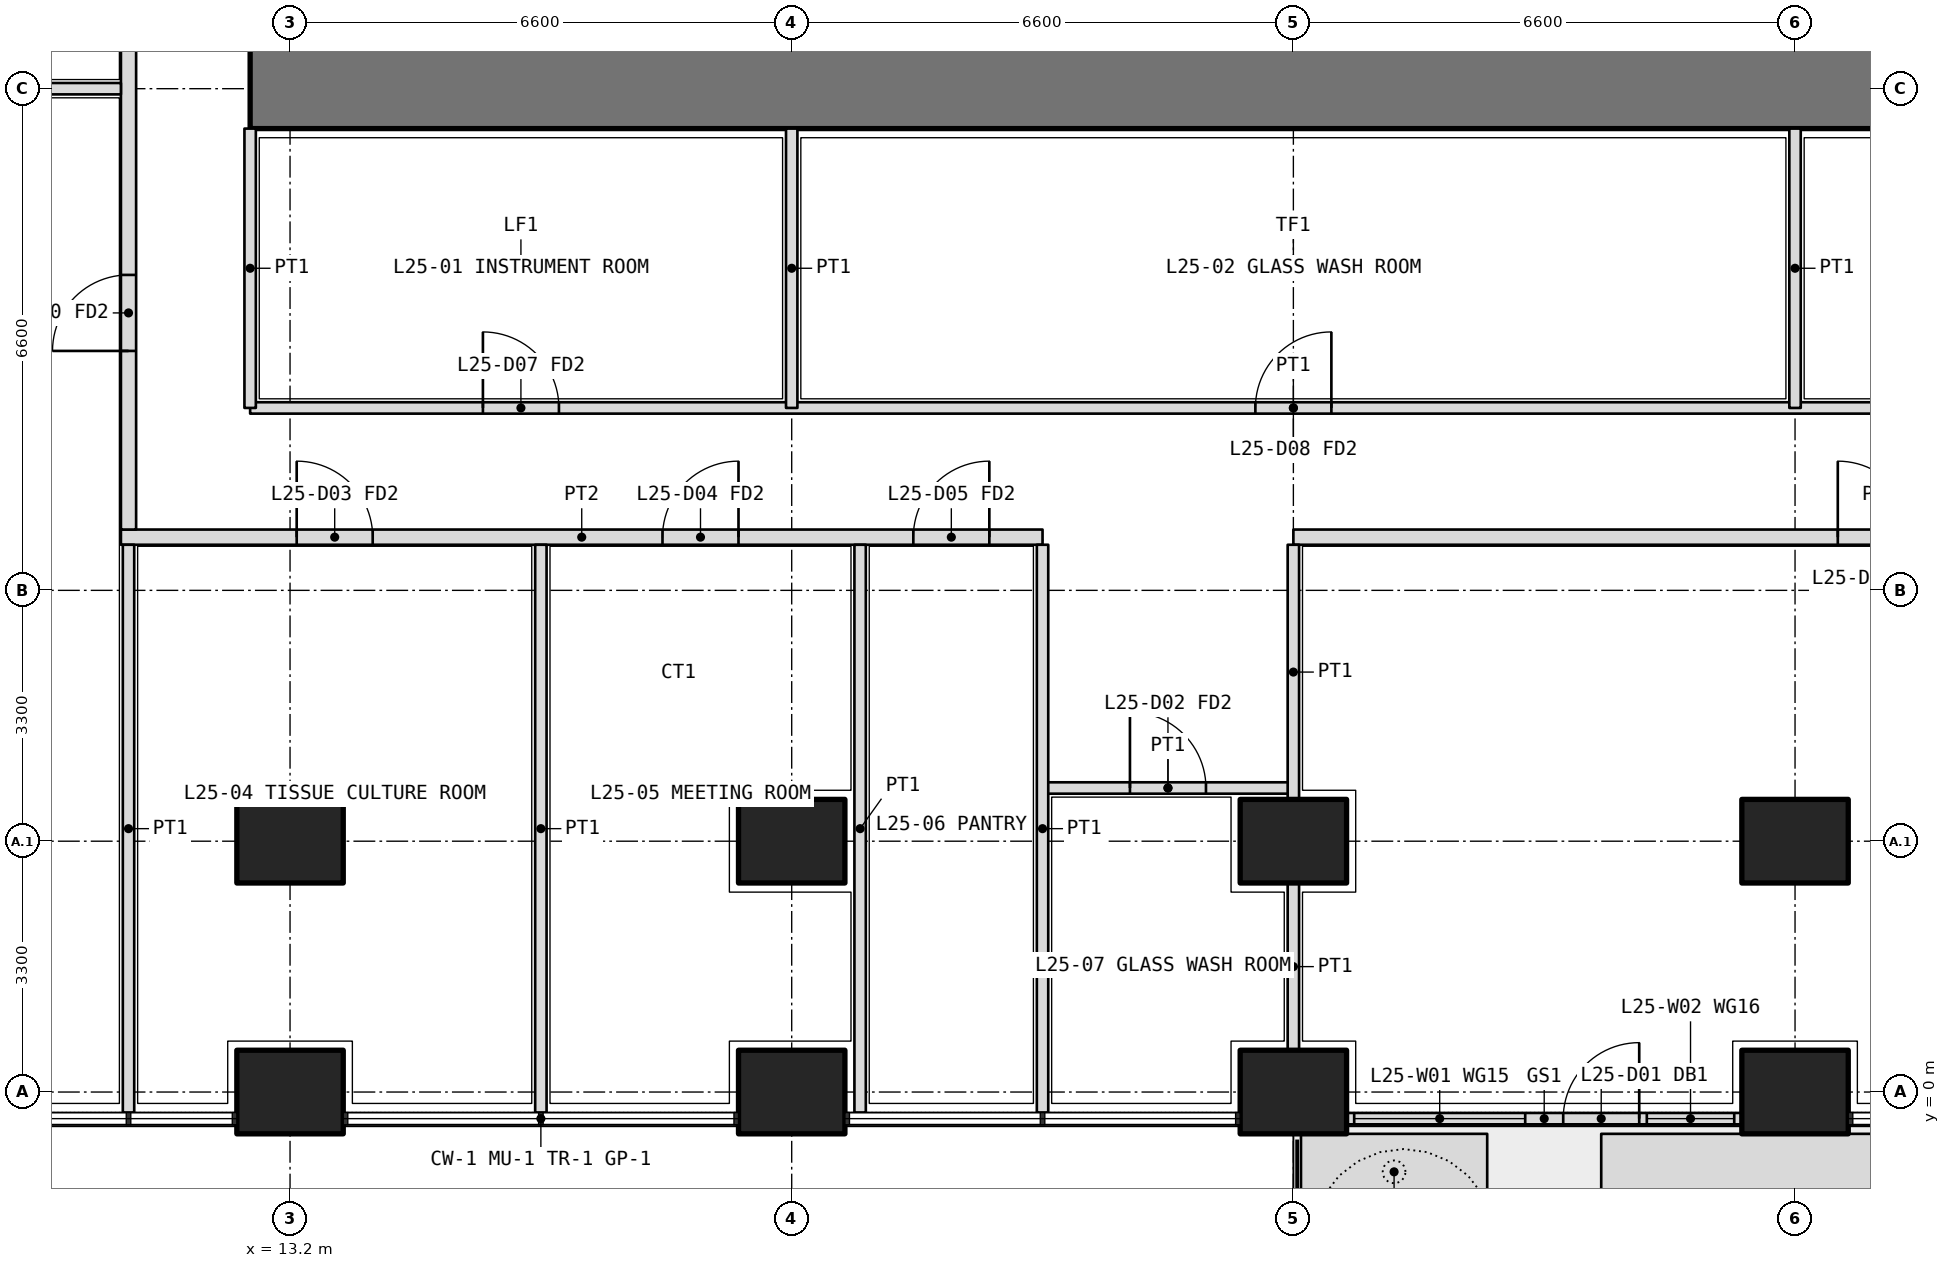
"""IFC4 building model, lengths in metres.
Left out: names, types, materials, properties, quantities, classifications, styles, units other than length and angle.
Written with IfcOpenShell. Run it as: python <this file> out.ifc"""

import sys

from ifc_helpers import new_model, si_unit, direction, frame, frame_2d, origin, origin_2d, place, context, subcontext, project, spatial, polyline, rectangle, outline, extrude, element, fill, save


model = new_model("IFC4")
c1 = context("Model", 3, precision=1e-05, world=origin(), true_north=direction((0.0, 1.0)))
c2 = subcontext(c1, "Body", "Model", "MODEL_VIEW")
j1 = project(units=[si_unit("LENGTHUNIT", "METRE"), si_unit("PLANEANGLEUNIT", "RADIAN")], contexts=[c1])
p1 = place(None, origin())
s1 = spatial("IfcSite", under=j1, at=p1, CompositionType="ELEMENT")
p2 = place(p1, origin())
s2 = spatial("IfcBuilding", under=s1, at=p2, CompositionType="ELEMENT")
p3 = place(p2, frame((0.0, 0.0, 111.6)))
s3 = spatial("IfcBuildingStorey", under=s2, at=p3, CompositionType="ELEMENT", Elevation=111.6)
for number, where, z_axis, x_axis in (
    (1, (13.2, 0.0, 0.0), (0.0, 0.0, 1.0), (1.0, 0.0, 0.0)),
    (2, (19.8, 0.0, 0.0), (0.0, 0.0, 1.0), (1.0, 0.0, 0.0)),
    (3, (26.4, 0.0, 0.0), (0.0, 0.0, 1.0), (1.0, 0.0, 0.0)),
    (4, (33.0, 0.0, 0.0), (0.0, 0.0, 1.0), (1.0, 0.0, 0.0)),
    (5, (13.2, 3.3, 0.0), (0.0, 0.0, 1.0), (1.0, 0.0, 0.0)),
    (6, (19.8, 3.3, 0.0), (0.0, 0.0, 1.0), (1.0, 0.0, 0.0)),
    (7, (26.4, 3.3, 0.0), (0.0, 0.0, 1.0), (1.0, 0.0, 0.0)),
    (8, (33.0, 3.3, 0.0), (0.0, 0.0, 1.0), (1.0, 0.0, 0.0)),
):
    element("IfcColumn", number, at=place(p3, frame(where, z_axis=z_axis, x_axis=x_axis)), inside=s3, PredefinedType="COLUMN", context=c2, shape_type="SweptSolid", body=[
        extrude(rectangle(XDim=1.4, YDim=1.1, at=origin_2d()), origin(), (0.0, 0.0, 1.0), 4.2),
    ])
p4 = place(p3, origin())
e9 = element("IfcWall", 9, at=p4, inside=s3, PredefinedType="USERDEFINED", context=c2, shape_type="SweptSolid", body=[
    extrude(outline(polyline([(26.5, -1.55), (28.95, -1.55), (28.95, -0.55), (26.5, -0.55), (26.5, -1.55)]), holes=[polyline([(26.65, -1.4), (28.8, -1.4), (28.8, -0.7), (26.65, -0.7), (26.65, -1.4)])]), origin(), (0.0, 0.0, 1.0), 1.05),
])
p5 = place(p3, origin())
e10 = element("IfcWall", 10, at=p5, inside=s3, PredefinedType="USERDEFINED", context=c2, shape_type="SweptSolid", body=[
    extrude(outline(polyline([(30.45, -1.55), (39.5, -1.55), (39.5, -0.55), (30.45, -0.55), (30.45, -1.55)]), holes=[polyline([(30.6, -1.4), (39.35, -1.4), (39.35, -0.7), (30.6, -0.7), (30.6, -1.4)])]), origin(), (0.0, 0.0, 1.0), 1.05),
])
p6 = place(p3, frame((27.1, -0.35, 0.0), z_axis=(0.0, 0.0, 1.0), x_axis=(1.0, 0.0, 0.0)))
e11 = element("IfcWall", 11, at=p6, inside=s3, PredefinedType="SOLIDWALL", context=c2, shape_type="SweptSolid", body=[
    extrude(rectangle(XDim=5.2, YDim=0.15, at=frame_2d((2.6, 0.0))), origin(), (0.0, 0.0, 1.0), 2.7),
])
p7 = place(p6, frame((2.85, 0.0, 0.0)))
e12 = element("IfcOpeningElement", 12, at=p7, cuts=e11, PredefinedType="OPENING", context=c2, shape_type="SweptSolid", body=[
    extrude(rectangle(XDim=1.0, YDim=2.4, at=frame_2d((0.5, 1.2))), frame((0.0, 0.085, 0.0), z_axis=(0.0, -1.0, 0.0), x_axis=(1.0, 0.0, 0.0)), (0.0, 0.0, 1.0), 0.17),
])
p8 = place(p6, frame((0.1, 0.0, 0.1)))
e13 = element("IfcOpeningElement", 13, at=p8, cuts=e11, PredefinedType="OPENING", context=c2, shape_type="SweptSolid", body=[
    extrude(rectangle(XDim=2.25, YDim=2.3, at=frame_2d((1.125, 1.15))), frame((0.0, 0.085, 0.0), z_axis=(0.0, -1.0, 0.0), x_axis=(1.0, 0.0, 0.0)), (0.0, 0.0, 1.0), 0.17),
])
p9 = place(p6, frame((3.95, 0.0, 0.1)))
e14 = element("IfcOpeningElement", 14, at=p9, cuts=e11, PredefinedType="OPENING", context=c2, shape_type="SweptSolid", body=[
    extrude(rectangle(XDim=1.15, YDim=2.3, at=frame_2d((0.575, 1.15))), frame((0.0, 0.085, 0.0), z_axis=(0.0, -1.0, 0.0), x_axis=(1.0, 0.0, 0.0)), (0.0, 0.0, 1.0), 0.17),
])
p10 = place(p3, frame((12.675, 13.2, 0.0), z_axis=(0.0, 0.0, 1.0), x_axis=(1.0, 0.0, 0.0)))
e15 = element("IfcWall", 15, at=p10, inside=s3, PredefinedType="SHEAR", context=c2, shape_type="SweptSolid", body=[
    extrude(rectangle(XDim=27.45, YDim=1.05, at=frame_2d((13.725, 0.0))), origin(), (0.0, 0.0, 1.0), 4.2),
])
p11 = place(p3, frame((12.675, 9.0, 0.0), z_axis=(0.0, 0.0, 1.0), x_axis=(1.0, 0.0, 0.0)))
e16 = element("IfcWall", 16, at=p11, inside=s3, PredefinedType="PARTITIONING", context=c2, shape_type="SweptSolid", body=[
    extrude(rectangle(XDim=27.45, YDim=0.15, at=frame_2d((13.725, 0.0))), origin(), (0.0, 0.0, 1.0), 2.85),
])
p12 = place(p11, frame((3.062, 0.0, 0.0)))
e17 = element("IfcOpeningElement", 17, at=p12, cuts=e16, PredefinedType="OPENING", context=c2, shape_type="SweptSolid", body=[
    extrude(rectangle(XDim=1.0, YDim=2.1, at=frame_2d((0.5, 1.05))), frame((0.0, 0.085, 0.0), z_axis=(0.0, -1.0, 0.0), x_axis=(1.0, 0.0, 0.0)), (0.0, 0.0, 1.0), 0.17),
])
p13 = place(p11, frame((13.225, 0.0, 0.0)))
e18 = element("IfcOpeningElement", 18, at=p13, cuts=e16, PredefinedType="OPENING", context=c2, shape_type="SweptSolid", body=[
    extrude(rectangle(XDim=1.0, YDim=2.1, at=frame_2d((0.5, 1.05))), frame((0.0, 0.085, 0.0), z_axis=(0.0, -1.0, 0.0), x_axis=(1.0, 0.0, 0.0)), (0.0, 0.0, 1.0), 0.17),
])
p14 = place(p11, frame((23.387, 0.0, 0.0)))
e19 = element("IfcOpeningElement", 19, at=p14, cuts=e16, PredefinedType="OPENING", context=c2, shape_type="SweptSolid", body=[
    extrude(rectangle(XDim=1.0, YDim=2.1, at=frame_2d((0.5, 1.05))), frame((0.0, 0.085, 0.0), z_axis=(0.0, -1.0, 0.0), x_axis=(1.0, 0.0, 0.0)), (0.0, 0.0, 1.0), 0.17),
])
for number, where, z_axis, x_axis in (
    (20, (12.675, 12.675, 0.0), (0.0, 0.0, 1.0), (0.0, -1.0, 0.0)),
    (21, (19.8, 12.675, 0.0), (0.0, 0.0, 1.0), (0.0, -1.0, 0.0)),
    (22, (33.0, 12.675, 0.0), (0.0, 0.0, 1.0), (0.0, -1.0, 0.0)),
):
    element("IfcWall", number, at=place(p3, frame(where, z_axis=z_axis, x_axis=x_axis)), inside=s3, PredefinedType="PARTITIONING", context=c2, shape_type="SweptSolid", body=[
        extrude(rectangle(XDim=3.675, YDim=0.15, at=frame_2d((1.837, 0.0))), origin(), (0.0, 0.0, 1.0), 2.85),
    ])
p15 = place(p3, frame((10.975, 7.3, 0.0), z_axis=(0.0, 0.0, 1.0), x_axis=(1.0, 0.0, 0.0)))
e23 = element("IfcWall", 23, at=p15, inside=s3, PredefinedType="PARTITIONING", context=c2, shape_type="SweptSolid", body=[
    extrude(rectangle(XDim=12.125, YDim=0.2, at=frame_2d((6.062, 0.0))), origin(), (0.0, 0.0, 1.0), 2.85),
])
p16 = place(p15, frame((2.312, 0.0, 0.0)))
e24 = element("IfcOpeningElement", 24, at=p16, cuts=e23, PredefinedType="OPENING", context=c2, shape_type="SweptSolid", body=[
    extrude(rectangle(XDim=1.0, YDim=2.1, at=frame_2d((0.5, 1.05))), frame((0.0, 0.11, 0.0), z_axis=(0.0, -1.0, 0.0), x_axis=(1.0, 0.0, 0.0)), (0.0, 0.0, 1.0), 0.22),
])
p17 = place(p15, frame((7.125, 0.0, 0.0)))
e25 = element("IfcOpeningElement", 25, at=p17, cuts=e23, PredefinedType="OPENING", context=c2, shape_type="SweptSolid", body=[
    extrude(rectangle(XDim=1.0, YDim=2.1, at=frame_2d((0.5, 1.05))), frame((0.0, 0.11, 0.0), z_axis=(0.0, -1.0, 0.0), x_axis=(1.0, 0.0, 0.0)), (0.0, 0.0, 1.0), 0.22),
])
p18 = place(p15, frame((10.425, 0.0, 0.0)))
e26 = element("IfcOpeningElement", 26, at=p18, cuts=e23, PredefinedType="OPENING", context=c2, shape_type="SweptSolid", body=[
    extrude(rectangle(XDim=1.0, YDim=2.1, at=frame_2d((0.5, 1.05))), frame((0.0, 0.11, 0.0), z_axis=(0.0, -1.0, 0.0), x_axis=(1.0, 0.0, 0.0)), (0.0, 0.0, 1.0), 0.22),
])
p19 = place(p3, frame((26.4, 7.3, 0.0), z_axis=(0.0, 0.0, 1.0), x_axis=(1.0, 0.0, 0.0)))
e27 = element("IfcWall", 27, at=p19, inside=s3, PredefinedType="PARTITIONING", context=c2, shape_type="SweptSolid", body=[
    extrude(rectangle(XDim=15.425, YDim=0.2, at=frame_2d((7.712, 0.0))), origin(), (0.0, 0.0, 1.0), 2.85),
])
p20 = place(p19, frame((7.163, 0.0, 0.0)))
e28 = element("IfcOpeningElement", 28, at=p20, cuts=e27, PredefinedType="OPENING", context=c2, shape_type="SweptSolid", body=[
    extrude(rectangle(XDim=1.0, YDim=2.1, at=frame_2d((0.5, 1.05))), frame((0.0, 0.11, 0.0), z_axis=(0.0, -1.0, 0.0), x_axis=(1.0, 0.0, 0.0)), (0.0, 0.0, 1.0), 0.22),
])
p21 = place(p3, frame((11.075, 7.4, 0.0), z_axis=(0.0, 0.0, 1.0), x_axis=(0.0, 1.0, 0.0)))
e29 = element("IfcWall", 29, at=p21, inside=s3, PredefinedType="PARTITIONING", context=c2, shape_type="SweptSolid", body=[
    extrude(rectangle(XDim=27.625, YDim=0.2, at=frame_2d((13.812, 0.0))), origin(), (0.0, 0.0, 1.0), 2.85),
])
p22 = place(p21, frame((2.35, 0.0, 0.0)))
e30 = element("IfcOpeningElement", 30, at=p22, cuts=e29, PredefinedType="OPENING", context=c2, shape_type="SweptSolid", body=[
    extrude(rectangle(XDim=1.0, YDim=2.1, at=frame_2d((0.5, 1.05))), frame((0.0, 0.11, 0.0), z_axis=(0.0, -1.0, 0.0), x_axis=(1.0, 0.0, 0.0)), (0.0, 0.0, 1.0), 0.22),
])
p23 = place(p21, frame((6.35, 0.0, 0.0)))
e31 = element("IfcOpeningElement", 31, at=p23, cuts=e29, PredefinedType="OPENING", context=c2, shape_type="SweptSolid", body=[
    extrude(rectangle(XDim=1.0, YDim=2.1, at=frame_2d((0.5, 1.05))), frame((0.0, 0.11, 0.0), z_axis=(0.0, -1.0, 0.0), x_axis=(1.0, 0.0, 0.0)), (0.0, 0.0, 1.0), 0.22),
])
p24 = place(p21, frame((9.425, 0.0, 0.0)))
e32 = element("IfcOpeningElement", 32, at=p24, cuts=e29, PredefinedType="OPENING", context=c2, shape_type="SweptSolid", body=[
    extrude(rectangle(XDim=0.9, YDim=2.1, at=frame_2d((0.45, 1.05))), frame((0.0, 0.11, 0.0), z_axis=(0.0, -1.0, 0.0), x_axis=(1.0, 0.0, 0.0)), (0.0, 0.0, 1.0), 0.22),
])
p25 = place(p21, frame((13.275, 0.0, 0.0)))
e33 = element("IfcOpeningElement", 33, at=p25, cuts=e29, PredefinedType="OPENING", context=c2, shape_type="SweptSolid", body=[
    extrude(rectangle(XDim=0.9, YDim=2.1, at=frame_2d((0.45, 1.05))), frame((0.0, 0.11, 0.0), z_axis=(0.0, -1.0, 0.0), x_axis=(1.0, 0.0, 0.0)), (0.0, 0.0, 1.0), 0.22),
])
p26 = place(p21, frame((16.8, 0.0, 0.0)))
e34 = element("IfcOpeningElement", 34, at=p26, cuts=e29, PredefinedType="OPENING", context=c2, shape_type="SweptSolid", body=[
    extrude(rectangle(XDim=1.0, YDim=2.1, at=frame_2d((0.5, 1.05))), frame((0.0, 0.11, 0.0), z_axis=(0.0, -1.0, 0.0), x_axis=(1.0, 0.0, 0.0)), (0.0, 0.0, 1.0), 0.22),
])
p27 = place(p21, frame((20.15, 0.0, 0.0)))
e35 = element("IfcOpeningElement", 35, at=p27, cuts=e29, PredefinedType="OPENING", context=c2, shape_type="SweptSolid", body=[
    extrude(rectangle(XDim=1.0, YDim=2.1, at=frame_2d((0.5, 1.05))), frame((0.0, 0.11, 0.0), z_axis=(0.0, -1.0, 0.0), x_axis=(1.0, 0.0, 0.0)), (0.0, 0.0, 1.0), 0.22),
])
p28 = place(p21, frame((23.45, 0.0, 0.0)))
e36 = element("IfcOpeningElement", 36, at=p28, cuts=e29, PredefinedType="OPENING", context=c2, shape_type="SweptSolid", body=[
    extrude(rectangle(XDim=1.0, YDim=2.1, at=frame_2d((0.5, 1.05))), frame((0.0, 0.11, 0.0), z_axis=(0.0, -1.0, 0.0), x_axis=(1.0, 0.0, 0.0)), (0.0, 0.0, 1.0), 0.22),
])
p29 = place(p21, frame((26.163, 0.0, 0.0)))
e37 = element("IfcOpeningElement", 37, at=p29, cuts=e29, PredefinedType="OPENING", context=c2, shape_type="SweptSolid", body=[
    extrude(rectangle(XDim=1.0, YDim=2.1, at=frame_2d((0.5, 1.05))), frame((0.0, 0.11, 0.0), z_axis=(0.0, -1.0, 0.0), x_axis=(1.0, 0.0, 0.0)), (0.0, 0.0, 1.0), 0.22),
])
for number, where, z_axis, x_axis in (
    (38, (11.075, -0.27, 0.0), (0.0, 0.0, 1.0), (0.0, 1.0, 0.0)),
    (39, (20.7, -0.27, 0.0), (0.0, 0.0, 1.0), (0.0, 1.0, 0.0)),
):
    element("IfcWall", number, at=place(p3, frame(where, z_axis=z_axis, x_axis=x_axis)), inside=s3, PredefinedType="PARTITIONING", context=c2, shape_type="SweptSolid", body=[
        extrude(rectangle(XDim=7.47, YDim=0.15, at=frame_2d((3.735, 0.0))), origin(), (0.0, 0.0, 1.0), 2.7),
    ])
p30 = place(p3, frame((23.1, 4.0, 0.0), z_axis=(0.0, 0.0, 1.0), x_axis=(1.0, 0.0, 0.0)))
e40 = element("IfcWall", 40, at=p30, inside=s3, PredefinedType="PARTITIONING", context=c2, shape_type="SweptSolid", body=[
    extrude(rectangle(XDim=3.3, YDim=0.15, at=frame_2d((1.65, 0.0))), origin(), (0.0, 0.0, 1.0), 2.85),
])
p31 = place(p30, frame((1.15, 0.0, 0.0)))
e41 = element("IfcOpeningElement", 41, at=p31, cuts=e40, PredefinedType="OPENING", context=c2, shape_type="SweptSolid", body=[
    extrude(rectangle(XDim=1.0, YDim=2.1, at=frame_2d((0.5, 1.05))), frame((0.0, 0.085, 0.0), z_axis=(0.0, -1.0, 0.0), x_axis=(1.0, 0.0, 0.0)), (0.0, 0.0, 1.0), 0.17),
])
for number, where, z_axis, x_axis in (
    (42, (16.5, -0.27, 0.0), (0.0, 0.0, 1.0), (0.0, 1.0, 0.0)),
    (43, (23.1, -0.27, 0.0), (0.0, 0.0, 1.0), (0.0, 1.0, 0.0)),
):
    element("IfcWall", number, at=place(p3, frame(where, z_axis=z_axis, x_axis=x_axis)), inside=s3, PredefinedType="PARTITIONING", context=c2, shape_type="SweptSolid", body=[
        extrude(rectangle(XDim=7.47, YDim=0.15, at=frame_2d((3.735, 0.0))), origin(), (0.0, 0.0, 1.0), 2.7),
    ])
p32 = place(p3, frame((26.4, 0.55, 0.0), z_axis=(0.0, 0.0, 1.0), x_axis=(0.0, 1.0, 0.0)))
e44 = element("IfcWall", 44, at=p32, inside=s3, PredefinedType="PARTITIONING", context=c2, shape_type="SweptSolid", body=[
    extrude(rectangle(XDim=2.2, YDim=0.15, at=frame_2d((1.1, 0.0))), origin(), (0.0, 0.0, 1.0), 2.85),
])
p33 = place(p3, frame((26.4, 3.85, 0.0), z_axis=(0.0, 0.0, 1.0), x_axis=(0.0, 1.0, 0.0)))
e45 = element("IfcWall", 45, at=p33, inside=s3, PredefinedType="PARTITIONING", context=c2, shape_type="SweptSolid", body=[
    extrude(rectangle(XDim=3.35, YDim=0.15, at=frame_2d((1.675, 0.0))), origin(), (0.0, 0.0, 1.0), 2.85),
])
p34 = place(p3, frame((7.15, 13.2, 0.0), z_axis=(0.0, 0.0, 1.0), x_axis=(1.0, 0.0, 0.0)))
e46 = element("IfcWall", 46, at=p34, inside=s3, PredefinedType="PARTITIONING", context=c2, shape_type="SweptSolid", body=[
    extrude(rectangle(XDim=3.825, YDim=0.15, at=frame_2d((1.913, 0.0))), origin(), (0.0, 0.0, 1.0), 2.85),
])
p35 = place(p7, origin())
e47 = element("IfcDoor", 47, at=p35, inside=s3, OperationType="SINGLE_SWING_RIGHT", PredefinedType="DOOR", context=c2, shape_type="SweptSolid", body=[
    extrude(rectangle(XDim=1.0, YDim=2.4, at=frame_2d((0.5, 1.2))), frame((0.0, 0.025, 0.0), z_axis=(0.0, -1.0, 0.0), x_axis=(1.0, 0.0, 0.0)), (0.0, 0.0, 1.0), 0.05),
])
fill(e12, e47)
p36 = place(p8, origin())
e48 = element("IfcWindow", 48, at=p36, inside=s3, PartitioningType="SINGLE_PANEL", PredefinedType="WINDOW", context=c2, shape_type="SweptSolid", body=[
    extrude(rectangle(XDim=2.25, YDim=2.3, at=frame_2d((1.125, 1.15))), frame((0.0, 0.03, 0.0), z_axis=(0.0, -1.0, 0.0), x_axis=(1.0, 0.0, 0.0)), (0.0, 0.0, 1.0), 0.06),
])
fill(e13, e48)
p37 = place(p9, origin())
e49 = element("IfcWindow", 49, at=p37, inside=s3, PartitioningType="SINGLE_PANEL", PredefinedType="WINDOW", context=c2, shape_type="SweptSolid", body=[
    extrude(rectangle(XDim=1.15, YDim=2.3, at=frame_2d((0.575, 1.15))), frame((0.0, 0.03, 0.0), z_axis=(0.0, -1.0, 0.0), x_axis=(1.0, 0.0, 0.0)), (0.0, 0.0, 1.0), 0.06),
])
fill(e14, e49)
p38 = place(p12, origin())
e50 = element("IfcDoor", 50, at=p38, inside=s3, OperationType="SINGLE_SWING_LEFT", PredefinedType="DOOR", context=c2, shape_type="SweptSolid", body=[
    extrude(rectangle(XDim=1.0, YDim=2.1, at=frame_2d((0.5, 1.05))), frame((0.0, 0.025, 0.0), z_axis=(0.0, -1.0, 0.0), x_axis=(1.0, 0.0, 0.0)), (0.0, 0.0, 1.0), 0.05),
])
fill(e17, e50)
p39 = place(p13, origin())
e51 = element("IfcDoor", 51, at=p39, inside=s3, OperationType="SINGLE_SWING_RIGHT", PredefinedType="DOOR", context=c2, shape_type="SweptSolid", body=[
    extrude(rectangle(XDim=1.0, YDim=2.1, at=frame_2d((0.5, 1.05))), frame((0.0, 0.025, 0.0), z_axis=(0.0, -1.0, 0.0), x_axis=(1.0, 0.0, 0.0)), (0.0, 0.0, 1.0), 0.05),
])
fill(e18, e51)
p40 = place(p16, origin())
e52 = element("IfcDoor", 52, at=p40, inside=s3, OperationType="SINGLE_SWING_LEFT", PredefinedType="DOOR", context=c2, shape_type="SweptSolid", body=[
    extrude(rectangle(XDim=1.0, YDim=2.1, at=frame_2d((0.5, 1.05))), frame((0.0, 0.025, 0.0), z_axis=(0.0, -1.0, 0.0), x_axis=(1.0, 0.0, 0.0)), (0.0, 0.0, 1.0), 0.05),
])
fill(e24, e52)
p41 = place(p17, origin())
e53 = element("IfcDoor", 53, at=p41, inside=s3, OperationType="SINGLE_SWING_RIGHT", PredefinedType="DOOR", context=c2, shape_type="SweptSolid", body=[
    extrude(rectangle(XDim=1.0, YDim=2.1, at=frame_2d((0.5, 1.05))), frame((0.0, 0.025, 0.0), z_axis=(0.0, -1.0, 0.0), x_axis=(1.0, 0.0, 0.0)), (0.0, 0.0, 1.0), 0.05),
])
fill(e25, e53)
p42 = place(p18, origin())
e54 = element("IfcDoor", 54, at=p42, inside=s3, OperationType="SINGLE_SWING_RIGHT", PredefinedType="DOOR", context=c2, shape_type="SweptSolid", body=[
    extrude(rectangle(XDim=1.0, YDim=2.1, at=frame_2d((0.5, 1.05))), frame((0.0, 0.025, 0.0), z_axis=(0.0, -1.0, 0.0), x_axis=(1.0, 0.0, 0.0)), (0.0, 0.0, 1.0), 0.05),
])
fill(e26, e54)
p43 = place(p31, origin())
e55 = element("IfcDoor", 55, at=p43, inside=s3, OperationType="SINGLE_SWING_LEFT", PredefinedType="DOOR", context=c2, shape_type="SweptSolid", body=[
    extrude(rectangle(XDim=1.0, YDim=2.1, at=frame_2d((0.5, 1.05))), frame((0.0, 0.025, 0.0), z_axis=(0.0, -1.0, 0.0), x_axis=(1.0, 0.0, 0.0)), (0.0, 0.0, 1.0), 0.05),
])
fill(e41, e55)
p44 = place(p20, origin())
e56 = element("IfcDoor", 56, at=p44, inside=s3, OperationType="SINGLE_SWING_LEFT", PredefinedType="DOOR", context=c2, shape_type="SweptSolid", body=[
    extrude(rectangle(XDim=1.0, YDim=2.1, at=frame_2d((0.5, 1.05))), frame((0.0, 0.025, 0.0), z_axis=(0.0, -1.0, 0.0), x_axis=(1.0, 0.0, 0.0)), (0.0, 0.0, 1.0), 0.05),
])
fill(e28, e56)
p45 = place(p22, origin())
e57 = element("IfcDoor", 57, at=p45, inside=s3, OperationType="SINGLE_SWING_LEFT", PredefinedType="DOOR", context=c2, shape_type="SweptSolid", body=[
    extrude(rectangle(XDim=1.0, YDim=2.1, at=frame_2d((0.5, 1.05))), frame((0.0, 0.025, 0.0), z_axis=(0.0, -1.0, 0.0), x_axis=(1.0, 0.0, 0.0)), (0.0, 0.0, 1.0), 0.05),
])
fill(e30, e57)
save(model, sys.argv[1])
